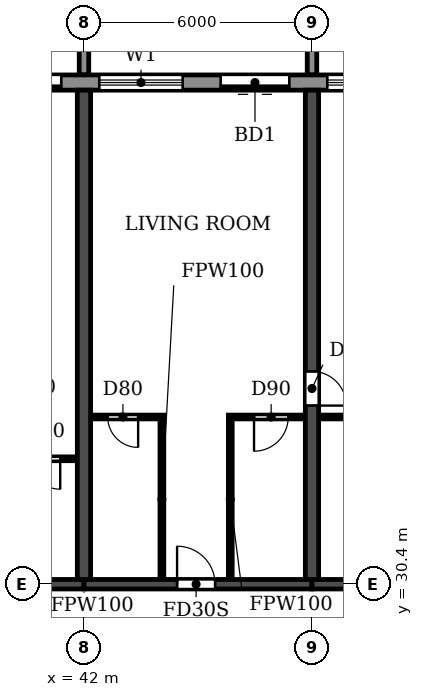
"""IFC4 building model, lengths in metres.
Left out: names, types, materials, properties, quantities, classifications, styles, units other than length and angle.
Written with IfcOpenShell. Run it as: python <this file> out.ifc"""

import sys

from ifc_helpers import new_model, si_unit, direction, frame, frame_2d, origin, place, context, subcontext, project, spatial, polyline, rectangle, outline, extrude, source, transform, mapped, element, fill, save


model = new_model("IFC4")
c1 = context("Model", 3, precision=1e-05, world=origin(), true_north=direction((0.0, 1.0)))
c2 = subcontext(c1, "Body", "Model", "MODEL_VIEW")
j1 = project(units=[si_unit("LENGTHUNIT", "METRE"), si_unit("PLANEANGLEUNIT", "RADIAN")], contexts=[c1])
p1 = place(None, origin())
s1 = spatial("IfcSite", under=j1, at=p1, CompositionType="ELEMENT")
p2 = place(p1, origin())
s2 = spatial("IfcBuilding", under=s1, at=p2, CompositionType="ELEMENT")
p3 = place(p2, frame((0.0, 0.0, 102.6)))
s3 = spatial("IfcBuildingStorey", under=s2, at=p3, CompositionType="ELEMENT", Elevation=102.6)
p4 = place(p3, frame((42.0, 30.525, 0.0), z_axis=(0.0, 0.0, 1.0), x_axis=(0.0, 1.0, 0.0)))
e1 = element("IfcWall", 1, at=p4, inside=s3, PredefinedType="SHEAR", context=c2, shape_type="SweptSolid", body=[
    extrude(rectangle(XDim=12.875, YDim=0.35, at=frame_2d((6.438, 0.0))), origin(), (0.0, 0.0, 1.0), 3.0),
])
p5 = place(p3, frame((48.0, 30.525, 0.0), z_axis=(0.0, 0.0, 1.0), x_axis=(0.0, 1.0, 0.0)))
e2 = element("IfcWall", 2, at=p5, inside=s3, PredefinedType="SHEAR", context=c2, shape_type="SweptSolid", body=[
    extrude(rectangle(XDim=12.875, YDim=0.35, at=frame_2d((6.438, 0.0))), origin(), (0.0, 0.0, 1.0), 3.0),
])
p6 = place(p5, frame((4.575, 0.0, 0.0)))
e3 = element("IfcOpeningElement", 3, at=p6, cuts=e2, PredefinedType="OPENING", context=c2, shape_type="SweptSolid", body=[
    extrude(rectangle(XDim=0.9, YDim=2.1, at=frame_2d((0.45, 1.05))), frame((0.0, 0.185, 0.0), z_axis=(0.0, -1.0, 0.0), x_axis=(1.0, 0.0, 0.0)), (0.0, 0.0, 1.0), 0.37),
])
p7 = place(p3, frame((36.0, 30.4, 0.0), z_axis=(0.0, 0.0, 1.0), x_axis=(1.0, 0.0, 0.0)))
e4 = element("IfcWall", 4, at=p7, inside=s3, PredefinedType="SHEAR", context=c2, shape_type="SweptSolid", body=[
    extrude(rectangle(XDim=6.0, YDim=0.25, at=frame_2d((3.0, 0.0))), origin(), (0.0, 0.0, 1.0), 2.4),
])
p8 = place(p7, frame((2.55, 0.0, 0.0)))
e5 = element("IfcOpeningElement", 5, at=p8, cuts=e4, PredefinedType="OPENING", context=c2, shape_type="SweptSolid", body=[
    extrude(rectangle(XDim=1.0, YDim=2.1, at=frame_2d((0.5, 1.05))), frame((0.0, 0.135, 0.0), z_axis=(0.0, -1.0, 0.0), x_axis=(1.0, 0.0, 0.0)), (0.0, 0.0, 1.0), 0.27),
])
p9 = place(p3, frame((42.0, 30.4, 0.0), z_axis=(0.0, 0.0, 1.0), x_axis=(1.0, 0.0, 0.0)))
e6 = element("IfcWall", 6, at=p9, inside=s3, PredefinedType="SHEAR", context=c2, shape_type="SweptSolid", body=[
    extrude(rectangle(XDim=6.0, YDim=0.25, at=frame_2d((3.0, 0.0))), origin(), (0.0, 0.0, 1.0), 2.4),
])
p10 = place(p9, frame((2.45, 0.0, 0.0)))
e7 = element("IfcOpeningElement", 7, at=p10, cuts=e6, PredefinedType="OPENING", context=c2, shape_type="SweptSolid", body=[
    extrude(rectangle(XDim=1.0, YDim=2.1, at=frame_2d((0.5, 1.05))), frame((0.0, 0.135, 0.0), z_axis=(0.0, -1.0, 0.0), x_axis=(1.0, 0.0, 0.0)), (0.0, 0.0, 1.0), 0.27),
])
p11 = place(p3, frame((48.0, 30.4, 0.0), z_axis=(0.0, 0.0, 1.0), x_axis=(1.0, 0.0, 0.0)))
e8 = element("IfcWall", 8, at=p11, inside=s3, PredefinedType="SHEAR", context=c2, shape_type="SweptSolid", body=[
    extrude(rectangle(XDim=6.0, YDim=0.25, at=frame_2d((3.0, 0.0))), origin(), (0.0, 0.0, 1.0), 2.4),
])
p12 = place(p3, frame((91.317, 43.6, 0.0), z_axis=(0.0, 0.0, 1.0), x_axis=(-1.0, 0.0, 0.0)))
e9 = element("IfcWall", 9, at=p12, inside=s3, PredefinedType="STANDARD", context=c2, shape_type="SweptSolid", body=[
    extrude(rectangle(XDim=80.634, YDim=0.4, at=frame_2d((40.317, 0.0))), origin(), (0.0, 0.0, 1.0), 3.0),
])
p13 = place(p12, frame((76.717, 0.0, 0.9)))
e10 = element("IfcOpeningElement", 10, at=p13, cuts=e9, PredefinedType="OPENING", context=c2, shape_type="SweptSolid", body=[
    extrude(rectangle(XDim=2.2, YDim=1.5, at=frame_2d((1.1, 0.75))), frame((0.0, 0.21, 0.0), z_axis=(0.0, -1.0, 0.0), x_axis=(1.0, 0.0, 0.0)), (0.0, 0.0, 1.0), 0.42),
])
p14 = place(p12, frame((73.917, 0.0, 0.0)))
e11 = element("IfcOpeningElement", 11, at=p14, cuts=e9, PredefinedType="OPENING", context=c2, shape_type="SweptSolid", body=[
    extrude(rectangle(XDim=1.8, YDim=2.4, at=frame_2d((0.9, 1.2))), frame((0.0, 0.21, 0.0), z_axis=(0.0, -1.0, 0.0), x_axis=(1.0, 0.0, 0.0)), (0.0, 0.0, 1.0), 0.42),
])
p15 = place(p12, frame((70.717, 0.0, 0.9)))
e12 = element("IfcOpeningElement", 12, at=p15, cuts=e9, PredefinedType="OPENING", context=c2, shape_type="SweptSolid", body=[
    extrude(rectangle(XDim=2.2, YDim=1.5, at=frame_2d((1.1, 0.75))), frame((0.0, 0.21, 0.0), z_axis=(0.0, -1.0, 0.0), x_axis=(1.0, 0.0, 0.0)), (0.0, 0.0, 1.0), 0.42),
])
p16 = place(p12, frame((67.717, 0.0, 0.9)))
e13 = element("IfcOpeningElement", 13, at=p16, cuts=e9, PredefinedType="OPENING", context=c2, shape_type="SweptSolid", body=[
    extrude(rectangle(XDim=2.2, YDim=1.5, at=frame_2d((1.1, 0.75))), frame((0.0, 0.21, 0.0), z_axis=(0.0, -1.0, 0.0), x_axis=(1.0, 0.0, 0.0)), (0.0, 0.0, 1.0), 0.42),
])
p17 = place(p12, frame((64.917, 0.0, 0.0)))
e14 = element("IfcOpeningElement", 14, at=p17, cuts=e9, PredefinedType="OPENING", context=c2, shape_type="SweptSolid", body=[
    extrude(rectangle(XDim=1.8, YDim=2.4, at=frame_2d((0.9, 1.2))), frame((0.0, 0.21, 0.0), z_axis=(0.0, -1.0, 0.0), x_axis=(1.0, 0.0, 0.0)), (0.0, 0.0, 1.0), 0.42),
])
p18 = place(p12, frame((61.717, 0.0, 0.9)))
e15 = element("IfcOpeningElement", 15, at=p18, cuts=e9, PredefinedType="OPENING", context=c2, shape_type="SweptSolid", body=[
    extrude(rectangle(XDim=2.2, YDim=1.5, at=frame_2d((1.1, 0.75))), frame((0.0, 0.21, 0.0), z_axis=(0.0, -1.0, 0.0), x_axis=(1.0, 0.0, 0.0)), (0.0, 0.0, 1.0), 0.42),
])
p19 = place(p12, frame((58.717, 0.0, 0.9)))
e16 = element("IfcOpeningElement", 16, at=p19, cuts=e9, PredefinedType="OPENING", context=c2, shape_type="SweptSolid", body=[
    extrude(rectangle(XDim=2.2, YDim=1.5, at=frame_2d((1.1, 0.75))), frame((0.0, 0.21, 0.0), z_axis=(0.0, -1.0, 0.0), x_axis=(1.0, 0.0, 0.0)), (0.0, 0.0, 1.0), 0.42),
])
p20 = place(p12, frame((55.717, 0.0, 0.9)))
e17 = element("IfcOpeningElement", 17, at=p20, cuts=e9, PredefinedType="OPENING", context=c2, shape_type="SweptSolid", body=[
    extrude(rectangle(XDim=2.2, YDim=1.5, at=frame_2d((1.1, 0.75))), frame((0.0, 0.21, 0.0), z_axis=(0.0, -1.0, 0.0), x_axis=(1.0, 0.0, 0.0)), (0.0, 0.0, 1.0), 0.42),
])
p21 = place(p12, frame((52.717, 0.0, 0.9)))
e18 = element("IfcOpeningElement", 18, at=p21, cuts=e9, PredefinedType="OPENING", context=c2, shape_type="SweptSolid", body=[
    extrude(rectangle(XDim=2.2, YDim=1.5, at=frame_2d((1.1, 0.75))), frame((0.0, 0.21, 0.0), z_axis=(0.0, -1.0, 0.0), x_axis=(1.0, 0.0, 0.0)), (0.0, 0.0, 1.0), 0.42),
])
p22 = place(p12, frame((49.917, 0.0, 0.0)))
e19 = element("IfcOpeningElement", 19, at=p22, cuts=e9, PredefinedType="OPENING", context=c2, shape_type="SweptSolid", body=[
    extrude(rectangle(XDim=1.8, YDim=2.4, at=frame_2d((0.9, 1.2))), frame((0.0, 0.21, 0.0), z_axis=(0.0, -1.0, 0.0), x_axis=(1.0, 0.0, 0.0)), (0.0, 0.0, 1.0), 0.42),
])
p23 = place(p12, frame((46.717, 0.0, 0.9)))
e20 = element("IfcOpeningElement", 20, at=p23, cuts=e9, PredefinedType="OPENING", context=c2, shape_type="SweptSolid", body=[
    extrude(rectangle(XDim=2.2, YDim=1.5, at=frame_2d((1.1, 0.75))), frame((0.0, 0.21, 0.0), z_axis=(0.0, -1.0, 0.0), x_axis=(1.0, 0.0, 0.0)), (0.0, 0.0, 1.0), 0.42),
])
p24 = place(p12, frame((43.917, 0.0, 0.0)))
e21 = element("IfcOpeningElement", 21, at=p24, cuts=e9, PredefinedType="OPENING", context=c2, shape_type="SweptSolid", body=[
    extrude(rectangle(XDim=1.8, YDim=2.4, at=frame_2d((0.9, 1.2))), frame((0.0, 0.21, 0.0), z_axis=(0.0, -1.0, 0.0), x_axis=(1.0, 0.0, 0.0)), (0.0, 0.0, 1.0), 0.42),
])
p25 = place(p12, frame((40.717, 0.0, 0.9)))
e22 = element("IfcOpeningElement", 22, at=p25, cuts=e9, PredefinedType="OPENING", context=c2, shape_type="SweptSolid", body=[
    extrude(rectangle(XDim=2.2, YDim=1.5, at=frame_2d((1.1, 0.75))), frame((0.0, 0.21, 0.0), z_axis=(0.0, -1.0, 0.0), x_axis=(1.0, 0.0, 0.0)), (0.0, 0.0, 1.0), 0.42),
])
p26 = place(p12, frame((37.717, 0.0, 0.9)))
e23 = element("IfcOpeningElement", 23, at=p26, cuts=e9, PredefinedType="OPENING", context=c2, shape_type="SweptSolid", body=[
    extrude(rectangle(XDim=2.2, YDim=1.5, at=frame_2d((1.1, 0.75))), frame((0.0, 0.21, 0.0), z_axis=(0.0, -1.0, 0.0), x_axis=(1.0, 0.0, 0.0)), (0.0, 0.0, 1.0), 0.42),
])
p27 = place(p12, frame((34.917, 0.0, 0.0)))
e24 = element("IfcOpeningElement", 24, at=p27, cuts=e9, PredefinedType="OPENING", context=c2, shape_type="SweptSolid", body=[
    extrude(rectangle(XDim=1.8, YDim=2.4, at=frame_2d((0.9, 1.2))), frame((0.0, 0.21, 0.0), z_axis=(0.0, -1.0, 0.0), x_axis=(1.0, 0.0, 0.0)), (0.0, 0.0, 1.0), 0.42),
])
p28 = place(p12, frame((31.717, 0.0, 0.9)))
e25 = element("IfcOpeningElement", 25, at=p28, cuts=e9, PredefinedType="OPENING", context=c2, shape_type="SweptSolid", body=[
    extrude(rectangle(XDim=2.2, YDim=1.5, at=frame_2d((1.1, 0.75))), frame((0.0, 0.21, 0.0), z_axis=(0.0, -1.0, 0.0), x_axis=(1.0, 0.0, 0.0)), (0.0, 0.0, 1.0), 0.42),
])
p29 = place(p12, frame((28.717, 0.0, 0.9)))
e26 = element("IfcOpeningElement", 26, at=p29, cuts=e9, PredefinedType="OPENING", context=c2, shape_type="SweptSolid", body=[
    extrude(rectangle(XDim=2.2, YDim=1.5, at=frame_2d((1.1, 0.75))), frame((0.0, 0.21, 0.0), z_axis=(0.0, -1.0, 0.0), x_axis=(1.0, 0.0, 0.0)), (0.0, 0.0, 1.0), 0.42),
])
p30 = place(p12, frame((25.917, 0.0, 0.0)))
e27 = element("IfcOpeningElement", 27, at=p30, cuts=e9, PredefinedType="OPENING", context=c2, shape_type="SweptSolid", body=[
    extrude(rectangle(XDim=1.8, YDim=2.4, at=frame_2d((0.9, 1.2))), frame((0.0, 0.21, 0.0), z_axis=(0.0, -1.0, 0.0), x_axis=(1.0, 0.0, 0.0)), (0.0, 0.0, 1.0), 0.42),
])
p31 = place(p12, frame((22.717, 0.0, 0.9)))
e28 = element("IfcOpeningElement", 28, at=p31, cuts=e9, PredefinedType="OPENING", context=c2, shape_type="SweptSolid", body=[
    extrude(rectangle(XDim=2.2, YDim=1.5, at=frame_2d((1.1, 0.75))), frame((0.0, 0.21, 0.0), z_axis=(0.0, -1.0, 0.0), x_axis=(1.0, 0.0, 0.0)), (0.0, 0.0, 1.0), 0.42),
])
p32 = place(p12, frame((19.717, 0.0, 0.9)))
e29 = element("IfcOpeningElement", 29, at=p32, cuts=e9, PredefinedType="OPENING", context=c2, shape_type="SweptSolid", body=[
    extrude(rectangle(XDim=2.2, YDim=1.5, at=frame_2d((1.1, 0.75))), frame((0.0, 0.21, 0.0), z_axis=(0.0, -1.0, 0.0), x_axis=(1.0, 0.0, 0.0)), (0.0, 0.0, 1.0), 0.42),
])
p33 = place(p12, frame((16.917, 0.0, 0.0)))
e30 = element("IfcOpeningElement", 30, at=p33, cuts=e9, PredefinedType="OPENING", context=c2, shape_type="SweptSolid", body=[
    extrude(rectangle(XDim=1.8, YDim=2.4, at=frame_2d((0.9, 1.2))), frame((0.0, 0.21, 0.0), z_axis=(0.0, -1.0, 0.0), x_axis=(1.0, 0.0, 0.0)), (0.0, 0.0, 1.0), 0.42),
])
p34 = place(p12, frame((13.717, 0.0, 0.9)))
e31 = element("IfcOpeningElement", 31, at=p34, cuts=e9, PredefinedType="OPENING", context=c2, shape_type="SweptSolid", body=[
    extrude(rectangle(XDim=2.2, YDim=1.5, at=frame_2d((1.1, 0.75))), frame((0.0, 0.21, 0.0), z_axis=(0.0, -1.0, 0.0), x_axis=(1.0, 0.0, 0.0)), (0.0, 0.0, 1.0), 0.42),
])
p35 = place(p12, frame((10.917, 0.0, 0.0)))
e32 = element("IfcOpeningElement", 32, at=p35, cuts=e9, PredefinedType="OPENING", context=c2, shape_type="SweptSolid", body=[
    extrude(rectangle(XDim=1.8, YDim=2.4, at=frame_2d((0.9, 1.2))), frame((0.0, 0.21, 0.0), z_axis=(0.0, -1.0, 0.0), x_axis=(1.0, 0.0, 0.0)), (0.0, 0.0, 1.0), 0.42),
])
p36 = place(p12, frame((7.717, 0.0, 0.9)))
e33 = element("IfcOpeningElement", 33, at=p36, cuts=e9, PredefinedType="OPENING", context=c2, shape_type="SweptSolid", body=[
    extrude(rectangle(XDim=2.2, YDim=1.5, at=frame_2d((1.1, 0.75))), frame((0.0, 0.21, 0.0), z_axis=(0.0, -1.0, 0.0), x_axis=(1.0, 0.0, 0.0)), (0.0, 0.0, 1.0), 0.42),
])
p37 = place(p12, frame((4.717, 0.0, 0.9)))
e34 = element("IfcOpeningElement", 34, at=p37, cuts=e9, PredefinedType="OPENING", context=c2, shape_type="SweptSolid", body=[
    extrude(rectangle(XDim=2.2, YDim=1.5, at=frame_2d((1.1, 0.75))), frame((0.0, 0.21, 0.0), z_axis=(0.0, -1.0, 0.0), x_axis=(1.0, 0.0, 0.0)), (0.0, 0.0, 1.0), 0.42),
])
p38 = place(p12, frame((1.917, 0.0, 0.0)))
e35 = element("IfcOpeningElement", 35, at=p38, cuts=e9, PredefinedType="OPENING", context=c2, shape_type="SweptSolid", body=[
    extrude(rectangle(XDim=1.8, YDim=2.4, at=frame_2d((0.9, 1.2))), frame((0.0, 0.21, 0.0), z_axis=(0.0, -1.0, 0.0), x_axis=(1.0, 0.0, 0.0)), (0.0, 0.0, 1.0), 0.42),
])
m1 = source(origin(), c2, "Body", "SweptSolid", [
    extrude(outline(polyline([(0.0, 0.0), (0.25, 0.0), (0.25, 3.1), (0.0, 3.1), (0.0, 0.0)])), origin(), (0.0, 0.0, 1.0), 3.1),
])
for number, where in (
    (36, (41.875, 43.8, 0.0)),
    (37, (47.875, 43.8, 0.0)),
):
    element("IfcWall", number, at=place(p3, frame(where)), inside=s3, PredefinedType="STANDARD", context=c2, shape_type="MappedRepresentation", body=[
        mapped(m1, transform((0.0, 0.0, 0.0))),
    ])
p39 = place(p3, frame((39.9, 33.7, 0.0), z_axis=(0.0, 0.0, 1.0), x_axis=(1.0, 0.0, 0.0)))
e38 = element("IfcWall", 38, at=p39, inside=s3, PredefinedType="PARTITIONING", context=c2, shape_type="SweptSolid", body=[
    extrude(rectangle(XDim=1.915, YDim=0.1, at=frame_2d((0.958, 0.0))), origin(), (0.0, 0.0, 1.0), 3.0),
])
p40 = place(p39, frame((0.675, 0.0, 0.0)))
e39 = element("IfcOpeningElement", 39, at=p40, cuts=e38, PredefinedType="OPENING", context=c2, shape_type="SweptSolid", body=[
    extrude(rectangle(XDim=0.8, YDim=2.1, at=frame_2d((0.4, 1.05))), frame((0.0, 0.06, 0.0), z_axis=(0.0, -1.0, 0.0), x_axis=(1.0, 0.0, 0.0)), (0.0, 0.0, 1.0), 0.12),
])
p41 = place(p3, frame((42.185, 34.8, 0.0), z_axis=(0.0, 0.0, 1.0), x_axis=(1.0, 0.0, 0.0)))
e40 = element("IfcWall", 40, at=p41, inside=s3, PredefinedType="PARTITIONING", context=c2, shape_type="SweptSolid", body=[
    extrude(rectangle(XDim=1.915, YDim=0.1, at=frame_2d((0.958, 0.0))), origin(), (0.0, 0.0, 1.0), 3.0),
])
p42 = place(p41, frame((0.44, 0.0, 0.0)))
e41 = element("IfcOpeningElement", 41, at=p42, cuts=e40, PredefinedType="OPENING", context=c2, shape_type="SweptSolid", body=[
    extrude(rectangle(XDim=0.8, YDim=2.1, at=frame_2d((0.4, 1.05))), frame((0.0, 0.06, 0.0), z_axis=(0.0, -1.0, 0.0), x_axis=(1.0, 0.0, 0.0)), (0.0, 0.0, 1.0), 0.12),
])
p43 = place(p3, frame((45.8, 34.8, 0.0), z_axis=(0.0, 0.0, 1.0), x_axis=(1.0, 0.0, 0.0)))
e42 = element("IfcWall", 42, at=p43, inside=s3, PredefinedType="PARTITIONING", context=c2, shape_type="SweptSolid", body=[
    extrude(rectangle(XDim=2.015, YDim=0.1, at=frame_2d((1.007, 0.0))), origin(), (0.0, 0.0, 1.0), 3.0),
])
p44 = place(p43, frame((0.675, 0.0, 0.0)))
e43 = element("IfcOpeningElement", 43, at=p44, cuts=e42, PredefinedType="OPENING", context=c2, shape_type="SweptSolid", body=[
    extrude(rectangle(XDim=0.9, YDim=2.1, at=frame_2d((0.45, 1.05))), frame((0.0, 0.06, 0.0), z_axis=(0.0, -1.0, 0.0), x_axis=(1.0, 0.0, 0.0)), (0.0, 0.0, 1.0), 0.12),
])
p45 = place(p3, frame((48.185, 34.8, 0.0), z_axis=(0.0, 0.0, 1.0), x_axis=(1.0, 0.0, 0.0)))
e44 = element("IfcWall", 44, at=p45, inside=s3, PredefinedType="PARTITIONING", context=c2, shape_type="SweptSolid", body=[
    extrude(rectangle(XDim=2.715, YDim=0.1, at=frame_2d((1.357, 0.0))), origin(), (0.0, 0.0, 1.0), 3.0),
])
p46 = place(p45, frame((0.915, 0.0, 0.0)))
e45 = element("IfcOpeningElement", 45, at=p46, cuts=e44, PredefinedType="OPENING", context=c2, shape_type="SweptSolid", body=[
    extrude(rectangle(XDim=0.8, YDim=2.1, at=frame_2d((0.4, 1.05))), frame((0.0, 0.06, 0.0), z_axis=(0.0, -1.0, 0.0), x_axis=(1.0, 0.0, 0.0)), (0.0, 0.0, 1.0), 0.12),
])
for number, where, z_axis, x_axis in (
    (46, (44.05, 30.535, 0.0), (0.0, 0.0, 1.0), (0.0, 1.0, 0.0)),
    (47, (45.85, 30.535, 0.0), (0.0, 0.0, 1.0), (0.0, 1.0, 0.0)),
):
    element("IfcWall", number, at=place(p3, frame(where, z_axis=z_axis, x_axis=x_axis)), inside=s3, PredefinedType="PARTITIONING", context=c2, shape_type="SweptSolid", body=[
        extrude(rectangle(XDim=4.215, YDim=0.1, at=frame_2d((2.107, 0.0))), origin(), (0.0, 0.0, 1.0), 3.0),
    ])
p47 = place(p22, origin())
e48 = element("IfcDoor", 48, at=p47, inside=s3, OperationType="DOUBLE_DOOR_SLIDING", PredefinedType="DOOR", context=c2, shape_type="SweptSolid", body=[
    extrude(rectangle(XDim=1.8, YDim=2.4, at=frame_2d((0.9, 1.2))), frame((0.0, 0.025, 0.0), z_axis=(0.0, -1.0, 0.0), x_axis=(1.0, 0.0, 0.0)), (0.0, 0.0, 1.0), 0.05),
])
fill(e19, e48)
p48 = place(p23, origin())
e49 = element("IfcWindow", 49, at=p48, inside=s3, PartitioningType="DOUBLE_PANEL_HORIZONTAL", PredefinedType="WINDOW", context=c2, shape_type="SweptSolid", body=[
    extrude(rectangle(XDim=2.2, YDim=1.5, at=frame_2d((1.1, 0.75))), frame((0.0, 0.03, 0.0), z_axis=(0.0, -1.0, 0.0), x_axis=(1.0, 0.0, 0.0)), (0.0, 0.0, 1.0), 0.06),
])
fill(e20, e49)
p49 = place(p24, origin())
e50 = element("IfcDoor", 50, at=p49, inside=s3, OperationType="DOUBLE_DOOR_SLIDING", PredefinedType="DOOR", context=c2, shape_type="SweptSolid", body=[
    extrude(rectangle(XDim=1.8, YDim=2.4, at=frame_2d((0.9, 1.2))), frame((0.0, 0.025, 0.0), z_axis=(0.0, -1.0, 0.0), x_axis=(1.0, 0.0, 0.0)), (0.0, 0.0, 1.0), 0.05),
])
fill(e21, e50)
p50 = place(p25, origin())
e51 = element("IfcWindow", 51, at=p50, inside=s3, PartitioningType="DOUBLE_PANEL_HORIZONTAL", PredefinedType="WINDOW", context=c2, shape_type="SweptSolid", body=[
    extrude(rectangle(XDim=2.2, YDim=1.5, at=frame_2d((1.1, 0.75))), frame((0.0, 0.03, 0.0), z_axis=(0.0, -1.0, 0.0), x_axis=(1.0, 0.0, 0.0)), (0.0, 0.0, 1.0), 0.06),
])
fill(e22, e51)
p51 = place(p40, frame((0.8, 0.0, 0.0), z_axis=(0.0, 0.0, 1.0), x_axis=(-1.0, 0.0, 0.0)))
e52 = element("IfcDoor", 52, at=p51, inside=s3, OperationType="SINGLE_SWING_LEFT", PredefinedType="DOOR", context=c2, shape_type="SweptSolid", body=[
    extrude(rectangle(XDim=0.8, YDim=2.1, at=frame_2d((0.4, 1.05))), frame((0.0, 0.025, 0.0), z_axis=(0.0, -1.0, 0.0), x_axis=(1.0, 0.0, 0.0)), (0.0, 0.0, 1.0), 0.05),
])
fill(e39, e52)
p52 = place(p42, frame((0.8, 0.0, 0.0), z_axis=(0.0, 0.0, 1.0), x_axis=(-1.0, 0.0, 0.0)))
e53 = element("IfcDoor", 53, at=p52, inside=s3, OperationType="SINGLE_SWING_LEFT", PredefinedType="DOOR", context=c2, shape_type="SweptSolid", body=[
    extrude(rectangle(XDim=0.8, YDim=2.1, at=frame_2d((0.4, 1.05))), frame((0.0, 0.025, 0.0), z_axis=(0.0, -1.0, 0.0), x_axis=(1.0, 0.0, 0.0)), (0.0, 0.0, 1.0), 0.05),
])
fill(e41, e53)
p53 = place(p10, origin())
e54 = element("IfcDoor", 54, at=p53, inside=s3, OperationType="SINGLE_SWING_LEFT", PredefinedType="DOOR", context=c2, shape_type="SweptSolid", body=[
    extrude(rectangle(XDim=1.0, YDim=2.1, at=frame_2d((0.5, 1.05))), frame((0.0, 0.025, 0.0), z_axis=(0.0, -1.0, 0.0), x_axis=(1.0, 0.0, 0.0)), (0.0, 0.0, 1.0), 0.05),
])
fill(e7, e54)
p54 = place(p44, frame((0.9, 0.0, 0.0), z_axis=(0.0, 0.0, 1.0), x_axis=(-1.0, 0.0, 0.0)))
e55 = element("IfcDoor", 55, at=p54, inside=s3, OperationType="SINGLE_SWING_RIGHT", PredefinedType="DOOR", context=c2, shape_type="SweptSolid", body=[
    extrude(rectangle(XDim=0.9, YDim=2.1, at=frame_2d((0.45, 1.05))), frame((0.0, 0.025, 0.0), z_axis=(0.0, -1.0, 0.0), x_axis=(1.0, 0.0, 0.0)), (0.0, 0.0, 1.0), 0.05),
])
fill(e43, e55)
p55 = place(p6, frame((0.9, 0.0, 0.0), z_axis=(0.0, 0.0, 1.0), x_axis=(-1.0, 0.0, 0.0)))
e56 = element("IfcDoor", 56, at=p55, inside=s3, OperationType="SINGLE_SWING_RIGHT", PredefinedType="DOOR", context=c2, shape_type="SweptSolid", body=[
    extrude(rectangle(XDim=0.9, YDim=2.1, at=frame_2d((0.45, 1.05))), frame((0.0, 0.025, 0.0), z_axis=(0.0, -1.0, 0.0), x_axis=(1.0, 0.0, 0.0)), (0.0, 0.0, 1.0), 0.05),
])
fill(e3, e56)
save(model, sys.argv[1])
